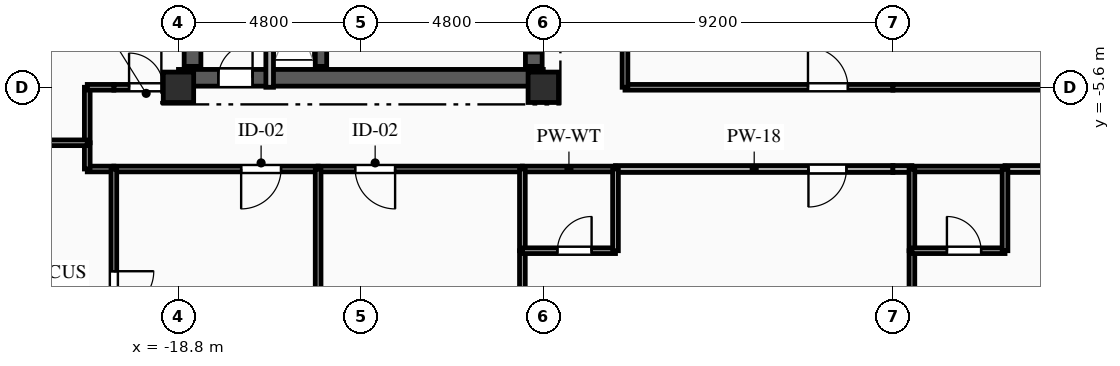
"""IFC4 building model, lengths in metres.
Left out: names, types, materials, properties, quantities, classifications, styles, units other than length and angle.
Written with IfcOpenShell. Run it as: python <this file> out.ifc"""

import sys

from ifc_helpers import new_model, si_unit, direction, frame, frame_2d, origin, origin_2d, place, context, subcontext, project, spatial, rectangle, extrude, element, fill, save


model = new_model("IFC4")
c1 = context("Model", 3, precision=1e-05, world=origin(), true_north=direction((0.0, 1.0)))
c2 = subcontext(c1, "Body", "Model", "MODEL_VIEW")
j1 = project(units=[si_unit("LENGTHUNIT", "METRE"), si_unit("PLANEANGLEUNIT", "RADIAN")], contexts=[c1])
p1 = place(None, origin())
s1 = spatial("IfcSite", under=j1, at=p1, CompositionType="ELEMENT")
p2 = place(p1, origin())
s2 = spatial("IfcBuilding", under=s1, at=p2, CompositionType="ELEMENT")
p3 = place(p2, frame((0.0, 0.0, 251.75)))
s3 = spatial("IfcBuildingStorey", under=s2, at=p3, CompositionType="ELEMENT", Elevation=251.75)
for number, where, z_axis, x_axis in (
    (1, (-18.8, -5.6, 0.0), (0.0, 0.0, 1.0), (1.0, 0.0, 0.0)),
    (2, (-9.2, -5.6, 0.0), (0.0, 0.0, 1.0), (1.0, 0.0, 0.0)),
):
    element("IfcColumn", number, at=place(p3, frame(where, z_axis=z_axis, x_axis=x_axis)), inside=s3, PredefinedType="COLUMN", context=c2, shape_type="SweptSolid", body=[
        extrude(rectangle(XDim=0.8, YDim=0.8, at=origin_2d()), origin(), (0.0, 0.0, 1.0), 3.35),
    ])
p4 = place(p3, frame((-18.8, -5.35, 0.0), z_axis=(0.0, 0.0, 1.0), x_axis=(1.0, 0.0, 0.0)))
e3 = element("IfcWall", 3, at=p4, inside=s3, PredefinedType="SHEAR", context=c2, shape_type="SweptSolid", body=[
    extrude(rectangle(XDim=9.6, YDim=0.44, at=frame_2d((4.8, 0.0))), origin(), (0.0, 0.0, 1.0), 3.04),
])
p5 = place(p4, frame((1.05, 0.0, 0.0)))
e4 = element("IfcOpeningElement", 4, at=p5, cuts=e3, PredefinedType="OPENING", context=c2, shape_type="SweptSolid", body=[
    extrude(rectangle(XDim=0.9, YDim=2.1, at=frame_2d((0.45, 1.05))), frame((0.0, 0.23, 0.0), z_axis=(0.0, -1.0, 0.0), x_axis=(1.0, 0.0, 0.0)), (0.0, 0.0, 1.0), 0.46),
])
p6 = place(p3, frame((-18.43, -5.05, 0.0), z_axis=(0.0, 0.0, 1.0), x_axis=(0.0, 1.0, 0.0)))
e5 = element("IfcWall", 5, at=p6, inside=s3, PredefinedType="SHEAR", context=c2, shape_type="SweptSolid", body=[
    extrude(rectangle(XDim=10.1, YDim=0.44, at=frame_2d((5.05, 0.0))), origin(), (0.0, 0.0, 1.0), 3.04),
])
p7 = place(p3, frame((-9.45, -5.05, 0.0), z_axis=(0.0, 0.0, 1.0), x_axis=(0.0, 1.0, 0.0)))
e6 = element("IfcWall", 6, at=p7, inside=s3, PredefinedType="SHEAR", context=c2, shape_type="SweptSolid", body=[
    extrude(rectangle(XDim=10.1, YDim=0.44, at=frame_2d((5.05, 0.0))), origin(), (0.0, 0.0, 1.0), 3.04),
])
p8 = place(p7, frame((7.175, 0.0, 0.0)))
e7 = element("IfcOpeningElement", 7, at=p8, cuts=e6, PredefinedType="OPENING", context=c2, shape_type="SweptSolid", body=[
    extrude(rectangle(XDim=0.9, YDim=2.1, at=frame_2d((0.45, 1.05))), frame((0.0, 0.23, 0.0), z_axis=(0.0, -1.0, 0.0), x_axis=(1.0, 0.0, 0.0)), (0.0, 0.0, 1.0), 0.46),
])
p9 = place(p7, frame((2.4, 0.0, 0.0)))
e8 = element("IfcOpeningElement", 8, at=p9, cuts=e6, PredefinedType="OPENING", context=c2, shape_type="SweptSolid", body=[
    extrude(rectangle(XDim=1.2, YDim=2.15, at=frame_2d((0.6, 1.075))), frame((0.0, 0.23, 0.0), z_axis=(0.0, -1.0, 0.0), x_axis=(1.0, 0.0, 0.0)), (0.0, 0.0, 1.0), 0.46),
])
p10 = place(p7, frame((0.35, 0.0, 0.0)))
e9 = element("IfcOpeningElement", 9, at=p10, cuts=e6, PredefinedType="OPENING", context=c2, shape_type="SweptSolid", body=[
    extrude(rectangle(XDim=0.9, YDim=2.1, at=frame_2d((0.45, 1.05))), frame((0.0, 0.23, 0.0), z_axis=(0.0, -1.0, 0.0), x_axis=(1.0, 0.0, 0.0)), (0.0, 0.0, 1.0), 0.46),
])
p11 = place(p7, frame((5.0, 0.0, 0.0)))
e10 = element("IfcOpeningElement", 10, at=p11, cuts=e6, PredefinedType="OPENING", context=c2, shape_type="SweptSolid", body=[
    extrude(rectangle(XDim=0.9, YDim=2.1, at=frame_2d((0.45, 1.05))), frame((0.0, 0.23, 0.0), z_axis=(0.0, -1.0, 0.0), x_axis=(1.0, 0.0, 0.0)), (0.0, 0.0, 1.0), 0.46),
])
p12 = place(p3, frame((-15.05, -5.05, 0.0), z_axis=(0.0, 0.0, 1.0), x_axis=(0.0, 1.0, 0.0)))
e11 = element("IfcWall", 11, at=p12, inside=s3, PredefinedType="SHEAR", context=c2, shape_type="SweptSolid", body=[
    extrude(rectangle(XDim=10.1, YDim=0.3, at=frame_2d((5.05, 0.0))), origin(), (0.0, 0.0, 1.0), 3.04),
])
p13 = place(p3, frame((-16.4, -5.6, 0.0), z_axis=(0.0, 0.0, 1.0), x_axis=(0.0, 1.0, 0.0)))
e12 = element("IfcWall", 12, at=p13, inside=s3, PredefinedType="PARTITIONING", context=c2, shape_type="SweptSolid", body=[
    extrude(rectangle(XDim=3.49, YDim=0.2, at=frame_2d((1.745, 0.0))), origin(), (0.0, 0.0, 1.0), 3.04),
])
p14 = place(p3, frame((-20.5, -7.75, 0.0), z_axis=(0.0, 0.0, 1.0), x_axis=(-1.0, 0.0, 0.0)))
e13 = element("IfcWall", 13, at=p14, inside=s3, PredefinedType="PARTITIONING", context=c2, shape_type="SweptSolid", body=[
    extrude(rectangle(XDim=0.7, YDim=0.15, at=frame_2d((0.35, 0.0))), origin(), (0.0, 0.0, 1.0), 3.04),
])
p15 = place(p3, frame((-21.2, -7.75, 0.0), z_axis=(0.0, 0.0, 1.0), x_axis=(0.0, 1.0, 0.0)))
e14 = element("IfcWall", 14, at=p15, inside=s3, PredefinedType="PARTITIONING", context=c2, shape_type="SweptSolid", body=[
    extrude(rectangle(XDim=0.69, YDim=0.15, at=frame_2d((0.345, 0.0))), origin(), (0.0, 0.0, 1.0), 2.695),
])
p16 = place(p3, frame((-20.5, -5.6, 0.0), z_axis=(0.0, 0.0, 1.0), x_axis=(1.0, 0.0, 0.0)))
e15 = element("IfcWall", 15, at=p16, inside=s3, PredefinedType="PARTITIONING", context=c2, shape_type="SweptSolid", body=[
    extrude(rectangle(XDim=1.7, YDim=0.15, at=frame_2d((0.85, 0.0))), origin(), (0.0, 0.0, 1.0), 3.04),
])
p17 = place(p16, frame((0.4, 0.0, 0.0)))
e16 = element("IfcOpeningElement", 16, at=p17, cuts=e15, PredefinedType="OPENING", context=c2, shape_type="SweptSolid", body=[
    extrude(rectangle(XDim=0.9, YDim=2.1, at=frame_2d((0.45, 1.05))), frame((0.0, 0.085, 0.0), z_axis=(0.0, -1.0, 0.0), x_axis=(1.0, 0.0, 0.0)), (0.0, 0.0, 1.0), 0.17),
])
p18 = place(p3, frame((-21.2, -7.06, 0.0), z_axis=(0.0, 0.0, 1.0), x_axis=(0.0, 1.0, 0.0)))
e17 = element("IfcWall", 17, at=p18, inside=s3, PredefinedType="PARTITIONING", context=c2, shape_type="SweptSolid", body=[
    extrude(rectangle(XDim=1.46, YDim=0.15, at=frame_2d((0.73, 0.0))), origin(), (0.0, 0.0, 1.0), 2.695),
])
p19 = place(p3, frame((-21.2, -5.6, 0.0), z_axis=(0.0, 0.0, 1.0), x_axis=(1.0, 0.0, 0.0)))
e18 = element("IfcWall", 18, at=p19, inside=s3, PredefinedType="PARTITIONING", context=c2, shape_type="SweptSolid", body=[
    extrude(rectangle(XDim=0.7, YDim=0.15, at=frame_2d((0.35, 0.0))), origin(), (0.0, 0.0, 1.0), 3.04),
])
p20 = place(p3, frame((-15.125, -7.75, 0.0), z_axis=(0.0, 0.0, 1.0), x_axis=(-1.0, 0.0, 0.0)))
e19 = element("IfcWall", 19, at=p20, inside=s3, PredefinedType="PARTITIONING", context=c2, shape_type="SweptSolid", body=[
    extrude(rectangle(XDim=5.375, YDim=0.15, at=frame_2d((2.688, 0.0))), origin(), (0.0, 0.0, 1.0), 3.04),
])
p21 = place(p20, frame((0.976, 0.0, 0.0)))
e20 = element("IfcOpeningElement", 20, at=p21, cuts=e19, PredefinedType="OPENING", context=c2, shape_type="SweptSolid", body=[
    extrude(rectangle(XDim=1.05, YDim=2.15, at=frame_2d((0.525, 1.075))), frame((0.0, 0.085, 0.0), z_axis=(0.0, -1.0, 0.0), x_axis=(1.0, 0.0, 0.0)), (0.0, 0.0, 1.0), 0.17),
])
p22 = place(p3, frame((-9.75, -7.75, 0.0), z_axis=(0.0, 0.0, 1.0), x_axis=(-1.0, 0.0, 0.0)))
e21 = element("IfcWall", 21, at=p22, inside=s3, PredefinedType="PARTITIONING", context=c2, shape_type="SweptSolid", body=[
    extrude(rectangle(XDim=5.375, YDim=0.15, at=frame_2d((2.688, 0.0))), origin(), (0.0, 0.0, 1.0), 3.04),
])
p23 = place(p22, frame((3.349, 0.0, 0.0)))
e22 = element("IfcOpeningElement", 22, at=p23, cuts=e21, PredefinedType="OPENING", context=c2, shape_type="SweptSolid", body=[
    extrude(rectangle(XDim=1.05, YDim=2.15, at=frame_2d((0.525, 1.075))), frame((0.0, 0.085, 0.0), z_axis=(0.0, -1.0, 0.0), x_axis=(1.0, 0.0, 0.0)), (0.0, 0.0, 1.0), 0.17),
])
p24 = place(p3, frame((0.0, -7.75, 0.0), z_axis=(0.0, 0.0, 1.0), x_axis=(-1.0, 0.0, 0.0)))
e23 = element("IfcWall", 23, at=p24, inside=s3, PredefinedType="PARTITIONING", context=c2, shape_type="SweptSolid", body=[
    extrude(rectangle(XDim=7.3, YDim=0.18, at=frame_2d((3.65, 0.0))), origin(), (0.0, 0.0, 1.0), 3.04),
])
p25 = place(p24, frame((1.222, 0.0, 0.0)))
e24 = element("IfcOpeningElement", 24, at=p25, cuts=e23, PredefinedType="OPENING", context=c2, shape_type="SweptSolid", body=[
    extrude(rectangle(XDim=1.0, YDim=2.15, at=frame_2d((0.5, 1.075))), frame((0.0, 0.1, 0.0), z_axis=(0.0, -1.0, 0.0), x_axis=(1.0, 0.0, 0.0)), (0.0, 0.0, 1.0), 0.2),
])
p26 = place(p3, frame((-7.3, -7.75, 0.0), z_axis=(0.0, 0.0, 1.0), x_axis=(-1.0, 0.0, 0.0)))
e25 = element("IfcWall", 25, at=p26, inside=s3, PredefinedType="PLUMBINGWALL", context=c2, shape_type="SweptSolid", body=[
    extrude(rectangle(XDim=2.45, YDim=0.15, at=frame_2d((1.225, 0.0))), origin(), (0.0, 0.0, 1.0), 3.04),
])
p27 = place(p3, frame((-7.05, -5.6, 0.0), z_axis=(0.0, 0.0, 1.0), x_axis=(1.0, 0.0, 0.0)))
e26 = element("IfcWall", 26, at=p27, inside=s3, PredefinedType="PARTITIONING", context=c2, shape_type="SweptSolid", body=[
    extrude(rectangle(XDim=7.05, YDim=0.15, at=frame_2d((3.525, 0.0))), origin(), (0.0, 0.0, 1.0), 2.525),
])
p28 = place(p27, frame((4.815, 0.0, 0.0)))
e27 = element("IfcOpeningElement", 27, at=p28, cuts=e26, PredefinedType="OPENING", context=c2, shape_type="SweptSolid", body=[
    extrude(rectangle(XDim=1.05, YDim=2.15, at=frame_2d((0.525, 1.075))), frame((0.0, 0.085, 0.0), z_axis=(0.0, -1.0, 0.0), x_axis=(1.0, 0.0, 0.0)), (0.0, 0.0, 1.0), 0.17),
])
p29 = place(p3, frame((0.5, -7.75, 0.0), z_axis=(0.0, 0.0, 1.0), x_axis=(-1.0, 0.0, 0.0)))
e28 = element("IfcWall", 28, at=p29, inside=s3, PredefinedType="PARTITIONING", context=c2, shape_type="SweptSolid", body=[
    extrude(rectangle(XDim=0.5, YDim=0.18, at=frame_2d((0.25, 0.0))), origin(), (0.0, 0.0, 1.0), 3.04),
])
p30 = place(p3, frame((10.75, -7.75, 0.0), z_axis=(0.0, 0.0, 1.0), x_axis=(-1.0, 0.0, 0.0)))
e29 = element("IfcWall", 29, at=p30, inside=s3, PredefinedType="PARTITIONING", context=c2, shape_type="SweptSolid", body=[
    extrude(rectangle(XDim=7.8, YDim=0.18, at=frame_2d((3.9, 0.0))), origin(), (0.0, 0.0, 1.0), 3.04),
])
p31 = place(p30, frame((5.515, 0.0, 0.0)))
e30 = element("IfcOpeningElement", 30, at=p31, cuts=e29, PredefinedType="OPENING", context=c2, shape_type="SweptSolid", body=[
    extrude(rectangle(XDim=1.0, YDim=2.15, at=frame_2d((0.5, 1.075))), frame((0.0, 0.1, 0.0), z_axis=(0.0, -1.0, 0.0), x_axis=(1.0, 0.0, 0.0)), (0.0, 0.0, 1.0), 0.2),
])
p32 = place(p3, frame((2.95, -7.75, 0.0), z_axis=(0.0, 0.0, 1.0), x_axis=(-1.0, 0.0, 0.0)))
e31 = element("IfcWall", 31, at=p32, inside=s3, PredefinedType="PLUMBINGWALL", context=c2, shape_type="SweptSolid", body=[
    extrude(rectangle(XDim=2.45, YDim=0.15, at=frame_2d((1.225, 0.0))), origin(), (0.0, 0.0, 1.0), 3.04),
])
p33 = place(p3, frame((0.0, -5.6, 0.0), z_axis=(0.0, 0.0, 1.0), x_axis=(1.0, 0.0, 0.0)))
e32 = element("IfcWall", 32, at=p33, inside=s3, PredefinedType="PARTITIONING", context=c2, shape_type="SweptSolid", body=[
    extrude(rectangle(XDim=7.05, YDim=0.15, at=frame_2d((3.525, 0.0))), origin(), (0.0, 0.0, 1.0), 2.525),
])
p34 = place(p3, frame((-7.05, 1.45, 0.0), z_axis=(0.0, 0.0, 1.0), x_axis=(0.0, -1.0, 0.0)))
e33 = element("IfcWall", 33, at=p34, inside=s3, PredefinedType="PARTITIONING", context=c2, shape_type="SweptSolid", body=[
    extrude(rectangle(XDim=7.05, YDim=0.15, at=frame_2d((3.525, 0.0))), origin(), (0.0, 0.0, 1.0), 3.04),
])
p35 = place(p3, frame((-24.0, -7.06, 0.0), z_axis=(0.0, 0.0, 1.0), x_axis=(1.0, 0.0, 0.0)))
e34 = element("IfcWall", 34, at=p35, inside=s3, PredefinedType="PARTITIONING", context=c2, shape_type="SweptSolid", body=[
    extrude(rectangle(XDim=2.8, YDim=0.15, at=frame_2d((1.4, 0.0))), origin(), (0.0, 0.0, 1.0), 3.04),
])
p36 = place(p3, frame((-20.5, -7.75, 0.0), z_axis=(0.0, 0.0, 1.0), x_axis=(0.0, -1.0, 0.0)))
e35 = element("IfcWall", 35, at=p36, inside=s3, PredefinedType="PARTITIONING", context=c2, shape_type="SweptSolid", body=[
    extrude(rectangle(XDim=10.65, YDim=0.15, at=frame_2d((5.325, 0.0))), origin(), (0.0, 0.0, 1.0), 2.665),
])
p37 = place(p36, frame((2.69, 0.0, 0.0)))
e36 = element("IfcOpeningElement", 36, at=p37, cuts=e35, PredefinedType="OPENING", context=c2, shape_type="SweptSolid", body=[
    extrude(rectangle(XDim=1.05, YDim=2.15, at=frame_2d((0.525, 1.075))), frame((0.0, 0.085, 0.0), z_axis=(0.0, -1.0, 0.0), x_axis=(1.0, 0.0, 0.0)), (0.0, 0.0, 1.0), 0.17),
])
p38 = place(p3, frame((-15.125, -7.75, 0.0), z_axis=(0.0, 0.0, 1.0), x_axis=(0.0, -1.0, 0.0)))
e37 = element("IfcWall", 37, at=p38, inside=s3, PredefinedType="PARTITIONING", context=c2, shape_type="SweptSolid", body=[
    extrude(rectangle(XDim=10.65, YDim=0.15, at=frame_2d((5.325, 0.0))), origin(), (0.0, 0.0, 1.0), 3.04),
])
p39 = place(p3, frame((-9.75, -9.9, 0.0), z_axis=(0.0, 0.0, 1.0), x_axis=(0.0, -1.0, 0.0)))
e38 = element("IfcWall", 38, at=p39, inside=s3, PredefinedType="PARTITIONING", context=c2, shape_type="SweptSolid", body=[
    extrude(rectangle(XDim=8.5, YDim=0.15, at=frame_2d((4.25, 0.0))), origin(), (0.0, 0.0, 1.0), 3.04),
])
p40 = place(p3, frame((-9.75, -7.75, 0.0), z_axis=(0.0, 0.0, 1.0), x_axis=(0.0, -1.0, 0.0)))
e39 = element("IfcWall", 39, at=p40, inside=s3, PredefinedType="PLUMBINGWALL", context=c2, shape_type="SweptSolid", body=[
    extrude(rectangle(XDim=2.15, YDim=0.15, at=frame_2d((1.075, 0.0))), origin(), (0.0, 0.0, 1.0), 3.04),
])
p41 = place(p3, frame((-9.75, -9.9, 0.0), z_axis=(0.0, 0.0, 1.0), x_axis=(1.0, 0.0, 0.0)))
e40 = element("IfcWall", 40, at=p41, inside=s3, PredefinedType="PLUMBINGWALL", context=c2, shape_type="SweptSolid", body=[
    extrude(rectangle(XDim=2.45, YDim=0.15, at=frame_2d((1.225, 0.0))), origin(), (0.0, 0.0, 1.0), 3.04),
])
p42 = place(p41, frame((0.921, 0.0, 0.0)))
e41 = element("IfcOpeningElement", 41, at=p42, cuts=e40, PredefinedType="OPENING", context=c2, shape_type="SweptSolid", body=[
    extrude(rectangle(XDim=0.9, YDim=2.1, at=frame_2d((0.45, 1.05))), frame((0.0, 0.085, 0.0), z_axis=(0.0, -1.0, 0.0), x_axis=(1.0, 0.0, 0.0)), (0.0, 0.0, 1.0), 0.17),
])
p43 = place(p3, frame((-7.3, -9.9, 0.0), z_axis=(0.0, 0.0, 1.0), x_axis=(0.0, 1.0, 0.0)))
e42 = element("IfcWall", 42, at=p43, inside=s3, PredefinedType="PLUMBINGWALL", context=c2, shape_type="SweptSolid", body=[
    extrude(rectangle(XDim=2.15, YDim=0.15, at=frame_2d((1.075, 0.0))), origin(), (0.0, 0.0, 1.0), 3.04),
])
p44 = place(p3, frame((0.5, -9.9, 0.0), z_axis=(0.0, 0.0, 1.0), x_axis=(0.0, -1.0, 0.0)))
e43 = element("IfcWall", 43, at=p44, inside=s3, PredefinedType="PARTITIONING", context=c2, shape_type="SweptSolid", body=[
    extrude(rectangle(XDim=8.5, YDim=0.15, at=frame_2d((4.25, 0.0))), origin(), (0.0, 0.0, 1.0), 3.04),
])
p45 = place(p3, frame((0.5, -7.75, 0.0), z_axis=(0.0, 0.0, 1.0), x_axis=(0.0, -1.0, 0.0)))
e44 = element("IfcWall", 44, at=p45, inside=s3, PredefinedType="PLUMBINGWALL", context=c2, shape_type="SweptSolid", body=[
    extrude(rectangle(XDim=2.15, YDim=0.15, at=frame_2d((1.075, 0.0))), origin(), (0.0, 0.0, 1.0), 3.04),
])
p46 = place(p3, frame((0.5, -9.9, 0.0), z_axis=(0.0, 0.0, 1.0), x_axis=(1.0, 0.0, 0.0)))
e45 = element("IfcWall", 45, at=p46, inside=s3, PredefinedType="PLUMBINGWALL", context=c2, shape_type="SweptSolid", body=[
    extrude(rectangle(XDim=2.45, YDim=0.15, at=frame_2d((1.225, 0.0))), origin(), (0.0, 0.0, 1.0), 3.04),
])
p47 = place(p46, frame((0.921, 0.0, 0.0)))
e46 = element("IfcOpeningElement", 46, at=p47, cuts=e45, PredefinedType="OPENING", context=c2, shape_type="SweptSolid", body=[
    extrude(rectangle(XDim=0.9, YDim=2.1, at=frame_2d((0.45, 1.05))), frame((0.0, 0.085, 0.0), z_axis=(0.0, -1.0, 0.0), x_axis=(1.0, 0.0, 0.0)), (0.0, 0.0, 1.0), 0.17),
])
p48 = place(p3, frame((2.95, -9.9, 0.0), z_axis=(0.0, 0.0, 1.0), x_axis=(0.0, 1.0, 0.0)))
e47 = element("IfcWall", 47, at=p48, inside=s3, PredefinedType="PLUMBINGWALL", context=c2, shape_type="SweptSolid", body=[
    extrude(rectangle(XDim=2.15, YDim=0.15, at=frame_2d((1.075, 0.0))), origin(), (0.0, 0.0, 1.0), 3.04),
])
p49 = place(p5, origin())
e48 = element("IfcDoor", 48, at=p49, inside=s3, OperationType="SINGLE_SWING_RIGHT", PredefinedType="DOOR", context=c2, shape_type="SweptSolid", body=[
    extrude(rectangle(XDim=0.9, YDim=2.1, at=frame_2d((0.45, 1.05))), frame((0.0, 0.025, 0.0), z_axis=(0.0, -1.0, 0.0), x_axis=(1.0, 0.0, 0.0)), (0.0, 0.0, 1.0), 0.05),
])
fill(e4, e48)
p50 = place(p10, origin())
e49 = element("IfcDoor", 49, at=p50, inside=s3, OperationType="SINGLE_SWING_RIGHT", PredefinedType="DOOR", context=c2, shape_type="SweptSolid", body=[
    extrude(rectangle(XDim=0.9, YDim=2.1, at=frame_2d((0.45, 1.05))), frame((0.0, 0.025, 0.0), z_axis=(0.0, -1.0, 0.0), x_axis=(1.0, 0.0, 0.0)), (0.0, 0.0, 1.0), 0.05),
])
fill(e9, e49)
p51 = place(p17, origin())
e50 = element("IfcDoor", 50, at=p51, inside=s3, OperationType="SINGLE_SWING_LEFT", PredefinedType="DOOR", context=c2, shape_type="SweptSolid", body=[
    extrude(rectangle(XDim=0.9, YDim=2.1, at=frame_2d((0.45, 1.05))), frame((0.0, 0.025, 0.0), z_axis=(0.0, -1.0, 0.0), x_axis=(1.0, 0.0, 0.0)), (0.0, 0.0, 1.0), 0.05),
])
fill(e16, e50)
p52 = place(p21, origin())
e51 = element("IfcDoor", 51, at=p52, inside=s3, OperationType="SINGLE_SWING_RIGHT", PredefinedType="DOOR", context=c2, shape_type="SweptSolid", body=[
    extrude(rectangle(XDim=1.05, YDim=2.15, at=frame_2d((0.525, 1.075))), frame((0.0, 0.025, 0.0), z_axis=(0.0, -1.0, 0.0), x_axis=(1.0, 0.0, 0.0)), (0.0, 0.0, 1.0), 0.05),
])
fill(e20, e51)
p53 = place(p23, origin())
e52 = element("IfcDoor", 52, at=p53, inside=s3, OperationType="SINGLE_SWING_LEFT", PredefinedType="DOOR", context=c2, shape_type="SweptSolid", body=[
    extrude(rectangle(XDim=1.05, YDim=2.15, at=frame_2d((0.525, 1.075))), frame((0.0, 0.025, 0.0), z_axis=(0.0, -1.0, 0.0), x_axis=(1.0, 0.0, 0.0)), (0.0, 0.0, 1.0), 0.05),
])
fill(e22, e52)
p54 = place(p25, origin())
e53 = element("IfcDoor", 53, at=p54, inside=s3, OperationType="SINGLE_SWING_RIGHT", PredefinedType="DOOR", context=c2, shape_type="SweptSolid", body=[
    extrude(rectangle(XDim=1.0, YDim=2.15, at=frame_2d((0.5, 1.075))), frame((0.0, 0.025, 0.0), z_axis=(0.0, -1.0, 0.0), x_axis=(1.0, 0.0, 0.0)), (0.0, 0.0, 1.0), 0.05),
])
fill(e24, e53)
p55 = place(p28, origin())
e54 = element("IfcDoor", 54, at=p55, inside=s3, OperationType="SINGLE_SWING_LEFT", PredefinedType="DOOR", context=c2, shape_type="SweptSolid", body=[
    extrude(rectangle(XDim=1.05, YDim=2.15, at=frame_2d((0.525, 1.075))), frame((0.0, 0.025, 0.0), z_axis=(0.0, -1.0, 0.0), x_axis=(1.0, 0.0, 0.0)), (0.0, 0.0, 1.0), 0.05),
])
fill(e27, e54)
p56 = place(p37, origin())
e55 = element("IfcDoor", 55, at=p56, inside=s3, OperationType="SINGLE_SWING_LEFT", PredefinedType="DOOR", context=c2, shape_type="SweptSolid", body=[
    extrude(rectangle(XDim=1.05, YDim=2.15, at=frame_2d((0.525, 1.075))), frame((0.0, 0.025, 0.0), z_axis=(0.0, -1.0, 0.0), x_axis=(1.0, 0.0, 0.0)), (0.0, 0.0, 1.0), 0.05),
])
fill(e36, e55)
p57 = place(p42, origin())
e56 = element("IfcDoor", 56, at=p57, inside=s3, OperationType="SINGLE_SWING_RIGHT", PredefinedType="DOOR", context=c2, shape_type="SweptSolid", body=[
    extrude(rectangle(XDim=0.9, YDim=2.1, at=frame_2d((0.45, 1.05))), frame((0.0, 0.025, 0.0), z_axis=(0.0, -1.0, 0.0), x_axis=(1.0, 0.0, 0.0)), (0.0, 0.0, 1.0), 0.05),
])
fill(e41, e56)
p58 = place(p47, origin())
e57 = element("IfcDoor", 57, at=p58, inside=s3, OperationType="SINGLE_SWING_LEFT", PredefinedType="DOOR", context=c2, shape_type="SweptSolid", body=[
    extrude(rectangle(XDim=0.9, YDim=2.1, at=frame_2d((0.45, 1.05))), frame((0.0, 0.025, 0.0), z_axis=(0.0, -1.0, 0.0), x_axis=(1.0, 0.0, 0.0)), (0.0, 0.0, 1.0), 0.05),
])
fill(e46, e57)
save(model, sys.argv[1])
